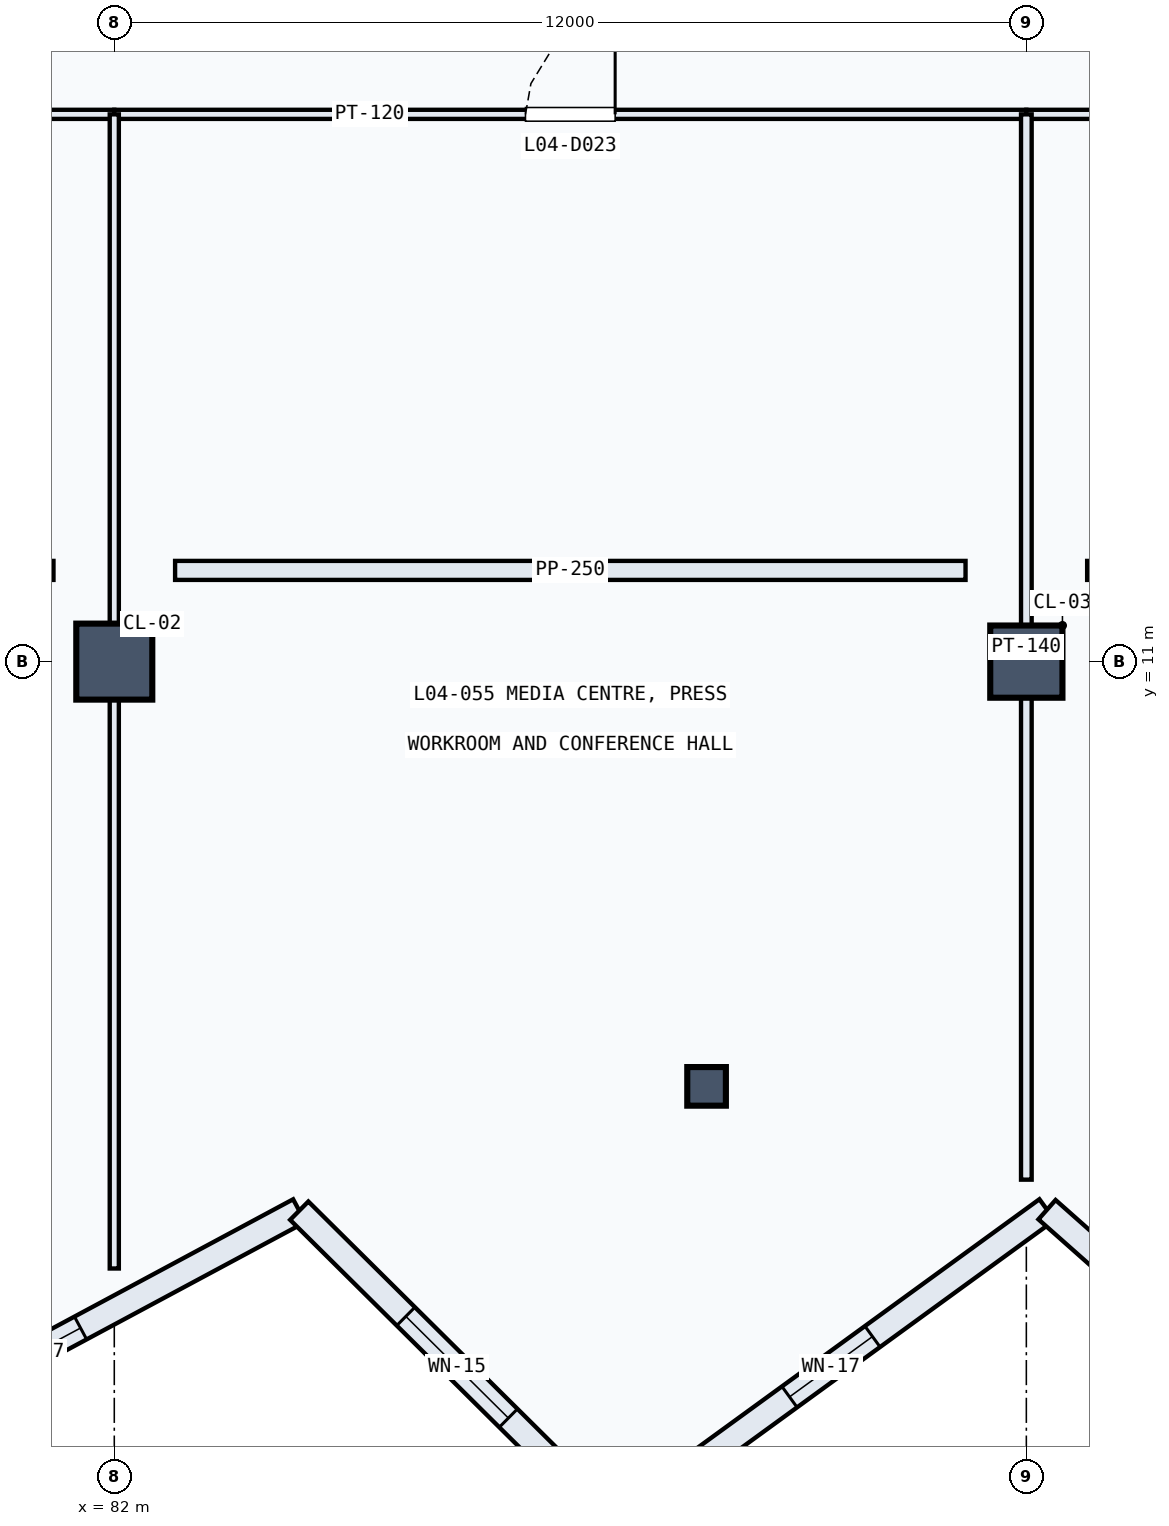
"""IFC4 building model, lengths in metres.
Left out: names, types, materials, properties, quantities, classifications, styles, units other than length and angle.
Written with IfcOpenShell. Run it as: python <this file> out.ifc"""

import sys

from ifc_helpers import new_model, si_unit, direction, frame, frame_2d, origin, origin_2d, place, context, subcontext, project, spatial, rectangle, hollow_circle, extrude, element, fill, save


model = new_model("IFC4")
c1 = context("Model", 3, precision=1e-05, world=origin(), true_north=direction((0.0, 1.0)))
c2 = subcontext(c1, "Body", "Model", "MODEL_VIEW")
j1 = project(units=[si_unit("LENGTHUNIT", "METRE"), si_unit("PLANEANGLEUNIT", "RADIAN")], contexts=[c1])
p1 = place(None, origin())
s1 = spatial("IfcSite", under=j1, at=p1, CompositionType="ELEMENT")
p2 = place(p1, origin())
s2 = spatial("IfcBuilding", under=s1, at=p2, CompositionType="ELEMENT")
p3 = place(p2, frame((0.0, 0.0, 19.5)))
s3 = spatial("IfcBuildingStorey", under=s2, at=p3, CompositionType="ELEMENT", Elevation=19.5)
p4 = place(p3, frame((82.0, 11.0, 0.0), z_axis=(0.0, 0.0, 1.0), x_axis=(1.0, 0.0, 0.0)))
e1 = element("IfcColumn", 1, at=p4, inside=s3, PredefinedType="COLUMN", context=c2, shape_type="SweptSolid", body=[
    extrude(rectangle(XDim=1.0, YDim=1.0, at=origin_2d()), origin(), (0.0, 0.0, 1.0), 4.8),
])
p5 = place(p3, frame((94.0, 11.0, 0.0), z_axis=(0.0, 0.0, 1.0), x_axis=(1.0, 0.0, 0.0)))
e2 = element("IfcColumn", 2, at=p5, inside=s3, PredefinedType="COLUMN", context=c2, shape_type="SweptSolid", body=[
    extrude(rectangle(XDim=0.95, YDim=0.95, at=origin_2d()), origin(), (0.0, 0.0, 1.0), 4.8),
])
p6 = place(p3, frame((89.793, 5.412, 0.0), z_axis=(0.0, 0.0, 1.0), x_axis=(1.0, 0.0, 0.0)))
e3 = element("IfcColumn", 3, at=p6, inside=s3, PredefinedType="COLUMN", context=c2, shape_type="SweptSolid", body=[
    extrude(hollow_circle(Radius=0.254, WallThickness=0.02, at=origin_2d()), origin(), (0.0, 0.0, 1.0), 4.8),
])
p7 = place(p3, frame((77.489, 0.051, 0.0), z_axis=(0.0, 0.0, 1.0), x_axis=(0.881201188687, 0.472741435731, 0.0)))
e4 = element("IfcWall", 4, at=p7, inside=s3, PredefinedType="USERDEFINED", context=c2, shape_type="SweptSolid", body=[
    extrude(rectangle(XDim=7.881, YDim=0.34, at=frame_2d((3.94, 0.0))), origin(), (0.0, 0.0, 1.0), 4.455),
])
p8 = place(p7, frame((3.265, 0.0, 0.8)))
e5 = element("IfcOpeningElement", 5, at=p8, cuts=e4, PredefinedType="OPENING", context=c2, shape_type="SweptSolid", body=[
    extrude(rectangle(XDim=1.35, YDim=2.1, at=frame_2d((0.675, 1.05))), frame((0.0, 0.18, 0.0), z_axis=(0.0, -1.0, 0.0), x_axis=(1.0, 0.0, 0.0)), (0.0, 0.0, 1.0), 0.36),
])
p9 = place(p3, frame((84.434, 3.777, 0.0), z_axis=(0.0, 0.0, 1.0), x_axis=(0.710084208502, -0.704116763638, 0.0)))
e6 = element("IfcWall", 6, at=p9, inside=s3, PredefinedType="USERDEFINED", context=c2, shape_type="SweptSolid", body=[
    extrude(rectangle(XDim=5.85, YDim=0.34, at=frame_2d((2.925, 0.0))), origin(), (0.0, 0.0, 1.0), 4.455),
])
p10 = place(p9, frame((1.975, 0.0, 0.85)))
e7 = element("IfcOpeningElement", 7, at=p10, cuts=e6, PredefinedType="OPENING", context=c2, shape_type="SweptSolid", body=[
    extrude(rectangle(XDim=1.9, YDim=1.6, at=frame_2d((0.95, 0.8))), frame((0.0, 0.18, 0.0), z_axis=(0.0, -1.0, 0.0), x_axis=(1.0, 0.0, 0.0)), (0.0, 0.0, 1.0), 0.36),
])
p11 = place(p3, frame((88.588, -0.343, 0.0), z_axis=(0.0, 0.0, 1.0), x_axis=(0.808841233488, 0.588027090371, 0.0)))
e8 = element("IfcWall", 8, at=p11, inside=s3, PredefinedType="USERDEFINED", context=c2, shape_type="SweptSolid", body=[
    extrude(rectangle(XDim=7.027, YDim=0.34, at=frame_2d((3.514, 0.0))), origin(), (0.0, 0.0, 1.0), 4.455),
])
p12 = place(p11, frame((2.839, 0.0, 0.8)))
e9 = element("IfcOpeningElement", 9, at=p12, cuts=e8, PredefinedType="OPENING", context=c2, shape_type="SweptSolid", body=[
    extrude(rectangle(XDim=1.35, YDim=2.1, at=frame_2d((0.675, 1.05))), frame((0.0, 0.18, 0.0), z_axis=(0.0, -1.0, 0.0), x_axis=(1.0, 0.0, 0.0)), (0.0, 0.0, 1.0), 0.36),
])
p13 = place(p3, frame((94.272, 3.79, 0.0), z_axis=(0.0, 0.0, 1.0), x_axis=(0.74844895461, -0.663192402205, 0.0)))
e10 = element("IfcWall", 10, at=p13, inside=s3, PredefinedType="USERDEFINED", context=c2, shape_type="SweptSolid", body=[
    extrude(rectangle(XDim=6.317, YDim=0.34, at=frame_2d((3.159, 0.0))), origin(), (0.0, 0.0, 1.0), 4.455),
])
p14 = place(p13, frame((2.208, 0.0, 0.85)))
e11 = element("IfcOpeningElement", 11, at=p14, cuts=e10, PredefinedType="OPENING", context=c2, shape_type="SweptSolid", body=[
    extrude(rectangle(XDim=1.9, YDim=1.6, at=frame_2d((0.95, 0.8))), frame((0.0, 0.18, 0.0), z_axis=(0.0, -1.0, 0.0), x_axis=(1.0, 0.0, 0.0)), (0.0, 0.0, 1.0), 0.36),
])
for number, where, z_axis, x_axis in (
    (12, (70.8, 12.2, 0.0), (0.0, 0.0, 1.0), (1.0, 0.0, 0.0)),
    (13, (82.8, 12.2, 0.0), (0.0, 0.0, 1.0), (1.0, 0.0, 0.0)),
):
    element("IfcWall", number, at=place(p3, frame(where, z_axis=z_axis, x_axis=x_axis)), inside=s3, PredefinedType="PARAPET", context=c2, shape_type="SweptSolid", body=[
        extrude(rectangle(XDim=10.4, YDim=0.25, at=frame_2d((5.2, 0.0))), origin(), (0.0, 0.0, 1.0), 0.8),
    ])
p15 = place(p3, frame((94.8, 12.2, 0.0), z_axis=(0.0, 0.0, 1.0), x_axis=(1.0, 0.0, 0.0)))
e14 = element("IfcWall", 14, at=p15, inside=s3, PredefinedType="PARAPET", context=c2, shape_type="SweptSolid", body=[
    extrude(rectangle(XDim=8.4, YDim=0.25, at=frame_2d((4.2, 0.0))), origin(), (0.0, 0.0, 1.0), 0.8),
])
p16 = place(p3, frame((76.0, 18.2, 0.0), z_axis=(0.0, 0.0, 1.0), x_axis=(1.0, 0.0, 0.0)))
e15 = element("IfcWall", 15, at=p16, inside=s3, PredefinedType="PARTITIONING", context=c2, shape_type="SweptSolid", body=[
    extrude(rectangle(XDim=6.0, YDim=0.12, at=frame_2d((3.0, 0.0))), origin(), (0.0, 0.0, 1.0), 3.64),
])
p17 = place(p16, frame((2.51, 0.0, 0.0)))
e16 = element("IfcOpeningElement", 16, at=p17, cuts=e15, PredefinedType="OPENING", context=c2, shape_type="SweptSolid", body=[
    extrude(rectangle(XDim=0.98, YDim=2.1, at=frame_2d((0.49, 1.05))), frame((0.0, 0.07, 0.0), z_axis=(0.0, -1.0, 0.0), x_axis=(1.0, 0.0, 0.0)), (0.0, 0.0, 1.0), 0.14),
])
p18 = place(p3, frame((82.0, 18.2, 0.0), z_axis=(0.0, 0.0, 1.0), x_axis=(1.0, 0.0, 0.0)))
e17 = element("IfcWall", 17, at=p18, inside=s3, PredefinedType="PARTITIONING", context=c2, shape_type="SweptSolid", body=[
    extrude(rectangle(XDim=12.0, YDim=0.12, at=frame_2d((6.0, 0.0))), origin(), (0.0, 0.0, 1.0), 3.64),
])
p19 = place(p18, frame((5.41, 0.0, 0.0)))
e18 = element("IfcOpeningElement", 18, at=p19, cuts=e17, PredefinedType="OPENING", context=c2, shape_type="SweptSolid", body=[
    extrude(rectangle(XDim=1.18, YDim=2.15, at=frame_2d((0.59, 1.075))), frame((0.0, 0.07, 0.0), z_axis=(0.0, -1.0, 0.0), x_axis=(1.0, 0.0, 0.0)), (0.0, 0.0, 1.0), 0.14),
])
p20 = place(p3, frame((94.0, 18.2, 0.0), z_axis=(0.0, 0.0, 1.0), x_axis=(1.0, 0.0, 0.0)))
e19 = element("IfcWall", 19, at=p20, inside=s3, PredefinedType="PARTITIONING", context=c2, shape_type="SweptSolid", body=[
    extrude(rectangle(XDim=10.0, YDim=0.12, at=frame_2d((5.0, 0.0))), origin(), (0.0, 0.0, 1.0), 3.707),
])
p21 = place(p20, frame((4.48, 0.0, 0.0)))
e20 = element("IfcOpeningElement", 20, at=p21, cuts=e19, PredefinedType="OPENING", context=c2, shape_type="SweptSolid", body=[
    extrude(rectangle(XDim=1.04, YDim=2.2, at=frame_2d((0.52, 1.1))), frame((0.0, 0.07, 0.0), z_axis=(0.0, -1.0, 0.0), x_axis=(1.0, 0.0, 0.0)), (0.0, 0.0, 1.0), 0.14),
])
p22 = place(p3, frame((82.0, 3.016, 0.0), z_axis=(0.0, 0.0, 1.0), x_axis=(0.0, 1.0, 0.0)))
e21 = element("IfcWall", 21, at=p22, inside=s3, PredefinedType="PARTITIONING", context=c2, shape_type="SweptSolid", body=[
    extrude(rectangle(XDim=15.184, YDim=0.12, at=frame_2d((7.592, 0.0))), origin(), (0.0, 0.0, 1.0), 3.64),
])
p23 = place(p3, frame((94.0, 4.185, 0.0), z_axis=(0.0, 0.0, 1.0), x_axis=(0.0, 1.0, 0.0)))
e22 = element("IfcWall", 22, at=p23, inside=s3, PredefinedType="PARTITIONING", context=c2, shape_type="SweptSolid", body=[
    extrude(rectangle(XDim=14.015, YDim=0.14, at=frame_2d((7.008, 0.0))), origin(), (0.0, 0.0, 1.0), 3.707),
])
p24 = place(p8, origin())
e23 = element("IfcWindow", 23, at=p24, inside=s3, PartitioningType="SINGLE_PANEL", PredefinedType="WINDOW", context=c2, shape_type="SweptSolid", body=[
    extrude(rectangle(XDim=1.35, YDim=2.1, at=frame_2d((0.675, 1.05))), frame((0.0, 0.03, 0.0), z_axis=(0.0, -1.0, 0.0), x_axis=(1.0, 0.0, 0.0)), (0.0, 0.0, 1.0), 0.06),
])
fill(e5, e23)
p25 = place(p10, origin())
e24 = element("IfcWindow", 24, at=p25, inside=s3, PartitioningType="SINGLE_PANEL", PredefinedType="WINDOW", context=c2, shape_type="SweptSolid", body=[
    extrude(rectangle(XDim=1.9, YDim=1.6, at=frame_2d((0.95, 0.8))), frame((0.0, 0.03, 0.0), z_axis=(0.0, -1.0, 0.0), x_axis=(1.0, 0.0, 0.0)), (0.0, 0.0, 1.0), 0.06),
])
fill(e7, e24)
p26 = place(p12, origin())
e25 = element("IfcWindow", 25, at=p26, inside=s3, PartitioningType="SINGLE_PANEL", PredefinedType="WINDOW", context=c2, shape_type="SweptSolid", body=[
    extrude(rectangle(XDim=1.35, YDim=2.1, at=frame_2d((0.675, 1.05))), frame((0.0, 0.03, 0.0), z_axis=(0.0, -1.0, 0.0), x_axis=(1.0, 0.0, 0.0)), (0.0, 0.0, 1.0), 0.06),
])
fill(e9, e25)
p27 = place(p19, origin())
e26 = element("IfcDoor", 26, at=p27, inside=s3, OperationType="SINGLE_SWING_RIGHT", PredefinedType="DOOR", context=c2, shape_type="SweptSolid", body=[
    extrude(rectangle(XDim=1.18, YDim=2.15, at=frame_2d((0.59, 1.075))), frame((0.0, 0.025, 0.0), z_axis=(0.0, -1.0, 0.0), x_axis=(1.0, 0.0, 0.0)), (0.0, 0.0, 1.0), 0.05),
])
fill(e18, e26)
save(model, sys.argv[1])
